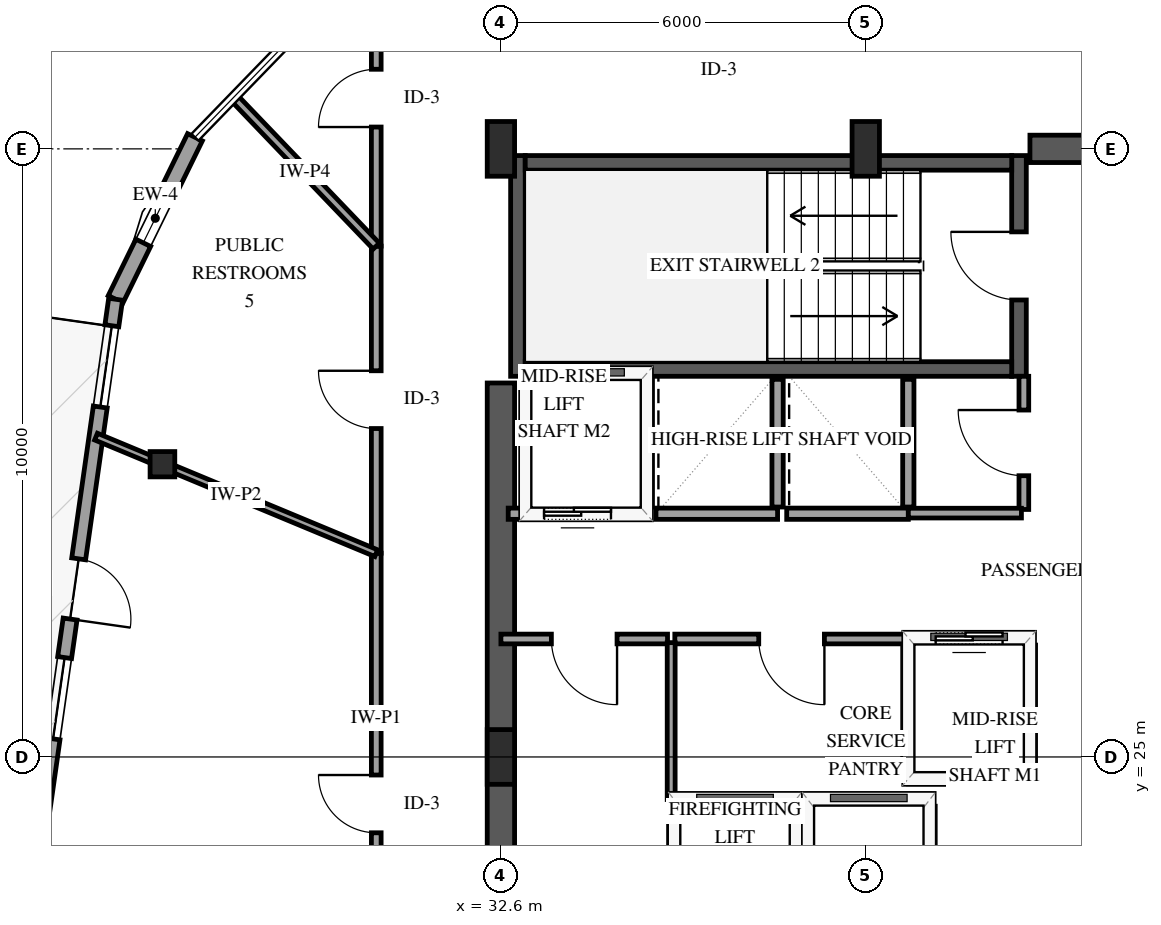
"""IFC4 building model, lengths in metres.
Left out: names, types, materials, properties, quantities, classifications, styles, units other than length and angle.
Written with IfcOpenShell. Run it as: python <this file> out.ifc"""

import sys

from ifc_helpers import new_model, si_unit, direction, frame, frame_2d, origin, origin_2d, place, context, subcontext, project, spatial, rectangle, i_section, extrude, element, fill, save


model = new_model("IFC4")
c1 = context("Model", 3, precision=1e-05, world=origin(), true_north=direction((0.0, 1.0)))
c2 = subcontext(c1, "Body", "Model", "MODEL_VIEW")
j1 = project(units=[si_unit("LENGTHUNIT", "METRE"), si_unit("PLANEANGLEUNIT", "RADIAN")], contexts=[c1])
p1 = place(None, origin())
s1 = spatial("IfcSite", under=j1, at=p1, CompositionType="ELEMENT")
p2 = place(p1, origin())
s2 = spatial("IfcBuilding", under=s1, at=p2, CompositionType="ELEMENT")
p3 = place(p2, frame((0.0, 0.0, 201.4)))
s3 = spatial("IfcBuildingStorey", under=s2, at=p3, CompositionType="ELEMENT", Elevation=201.4)
p4 = place(p3, frame((32.88, 31.26, 0.0), z_axis=(0.0, 0.0, 1.0), x_axis=(0.0, 1.0, 0.0)))
e1 = element("IfcWall", 1, at=p4, inside=s3, PredefinedType="SHEAR", context=c2, shape_type="SweptSolid", body=[
    extrude(rectangle(XDim=3.63, YDim=0.24, at=frame_2d((1.815, 0.0))), origin(), (0.0, 0.0, 1.0), 3.6),
])
p5 = place(p3, frame((41.12, 31.26, 0.0), z_axis=(0.0, 0.0, 1.0), x_axis=(0.0, 1.0, 0.0)))
e2 = element("IfcWall", 2, at=p5, inside=s3, PredefinedType="SHEAR", context=c2, shape_type="SweptSolid", body=[
    extrude(rectangle(XDim=3.63, YDim=0.24, at=frame_2d((1.815, 0.0))), origin(), (0.0, 0.0, 1.0), 3.6),
])
p6 = place(p5, frame((1.255, 0.0, 0.0)))
e3 = element("IfcOpeningElement", 3, at=p6, cuts=e2, PredefinedType="OPENING", context=c2, shape_type="SweptSolid", body=[
    extrude(rectangle(XDim=1.12, YDim=2.15, at=frame_2d((0.56, 1.075))), frame((0.0, 0.13, 0.0), z_axis=(0.0, -1.0, 0.0), x_axis=(1.0, 0.0, 0.0)), (0.0, 0.0, 1.0), 0.26),
])
for number, where, z_axis, x_axis in (
    (4, (33.0, 31.38, 0.0), (0.0, 0.0, 1.0), (1.0, 0.0, 0.0)),
    (5, (33.0, 34.77, 0.0), (0.0, 0.0, 1.0), (1.0, 0.0, 0.0)),
):
    element("IfcWall", number, at=place(p3, frame(where, z_axis=z_axis, x_axis=x_axis)), inside=s3, PredefinedType="SHEAR", context=c2, shape_type="SweptSolid", body=[
        extrude(rectangle(XDim=8.0, YDim=0.24, at=frame_2d((4.0, 0.0))), origin(), (0.0, 0.0, 1.0), 3.6),
    ])
p7 = place(p3, frame((32.6, 18.85, 0.0), z_axis=(0.0, 0.0, 1.0), x_axis=(0.0, 1.0, 0.0)))
e6 = element("IfcWall", 6, at=p7, inside=s3, PredefinedType="SHEAR", context=c2, shape_type="SweptSolid", body=[
    extrude(rectangle(XDim=12.3, YDim=0.45, at=frame_2d((6.15, 0.0))), origin(), (0.0, 0.0, 1.0), 3.6),
])
p8 = place(p3, frame((41.3, 35.0, 0.0), z_axis=(0.0, 0.0, 1.0), x_axis=(1.0, 0.0, 0.0)))
e7 = element("IfcWall", 7, at=p8, inside=s3, PredefinedType="SHEAR", context=c2, shape_type="SweptSolid", body=[
    extrude(rectangle(XDim=2.85, YDim=0.45, at=frame_2d((1.425, 0.0))), origin(), (0.0, 0.0, 1.0), 3.6),
])
for number, where, z_axis, x_axis in (
    (8, (32.6, 25.0, 0.0), (0.0, 0.0, 1.0), (1.0, 0.0, 0.0)),
    (9, (32.6, 35.0, 0.0), (0.0, 0.0, 1.0), (1.0, 0.0, 0.0)),
    (10, (38.6, 35.0, 0.0), (0.0, 0.0, 1.0), (1.0, 0.0, 0.0)),
):
    element("IfcColumn", number, at=place(p3, frame(where, z_axis=z_axis, x_axis=x_axis)), inside=s3, PredefinedType="PILASTER", context=c2, shape_type="SweptSolid", body=[
        extrude(rectangle(XDim=0.45, YDim=0.9, at=origin_2d()), origin(), (0.0, 0.0, 1.0), 3.6),
    ])
p9 = place(p3, frame((27.034, 29.814, 0.0), z_axis=(0.0, 0.0, 1.0), x_axis=(1.0, 0.0, 0.0)))
e11 = element("IfcColumn", 11, at=p9, inside=s3, PredefinedType="COLUMN", context=c2, shape_type="SweptSolid", body=[
    extrude(i_section(OverallWidth=0.406, OverallDepth=0.416, WebThickness=0.03, FlangeThickness=0.048, FilletRadius=0.038, at=origin_2d()), origin(), (0.0, 0.0, 1.0), 3.6),
])
p10 = place(p3, frame((27.569, 35.191, 0.0), z_axis=(0.0, 0.0, 1.0), x_axis=(-0.439956847616, -0.898018915299, 0.0)))
e12 = element("IfcWall", 12, at=p10, inside=s3, PredefinedType="SOLIDWALL", context=c2, shape_type="SweptSolid", body=[
    extrude(rectangle(XDim=2.967, YDim=0.27, at=frame_2d((1.483, 0.0))), origin(), (0.0, 0.0, 1.0), 2.679),
])
p11 = place(p10, frame((1.033, 0.0, 0.75)))
e13 = element("IfcOpeningElement", 13, at=p11, cuts=e12, PredefinedType="OPENING", context=c2, shape_type="SweptSolid", body=[
    extrude(rectangle(XDim=0.9, YDim=1.5, at=frame_2d((0.45, 0.75))), frame((0.0, 0.145, 0.0), z_axis=(0.0, -1.0, 0.0), x_axis=(1.0, 0.0, 0.0)), (0.0, 0.0, 1.0), 0.29),
])
p12 = place(p3, frame((26.264, 32.527, 0.0), z_axis=(0.0, 0.0, 1.0), x_axis=(-0.14089216596, -0.990024947954, 0.0)))
e14 = element("IfcWall", 14, at=p12, inside=s3, PredefinedType="SOLIDWALL", context=c2, shape_type="SweptSolid", body=[
    extrude(rectangle(XDim=9.624, YDim=0.23, at=frame_2d((4.812, 0.0))), origin(), (0.0, 0.0, 1.0), 2.679),
])
p13 = place(p12, frame((4.312, 0.0, 0.0)))
e15 = element("IfcOpeningElement", 15, at=p13, cuts=e14, PredefinedType="OPENING", context=c2, shape_type="SweptSolid", body=[
    extrude(rectangle(XDim=1.0, YDim=2.15, at=frame_2d((0.5, 1.075))), frame((0.0, 0.125, 0.0), z_axis=(0.0, -1.0, 0.0), x_axis=(1.0, 0.0, 0.0)), (0.0, 0.0, 1.0), 0.25),
])
p14 = place(p12, frame((0.44, 0.0, 0.72)))
e16 = element("IfcOpeningElement", 16, at=p14, cuts=e14, PredefinedType="OPENING", context=c2, shape_type="SweptSolid", body=[
    extrude(rectangle(XDim=1.35, YDim=1.65, at=frame_2d((0.675, 0.825))), frame((0.0, 0.125, 0.0), z_axis=(0.0, -1.0, 0.0), x_axis=(1.0, 0.0, 0.0)), (0.0, 0.0, 1.0), 0.25),
])
p15 = place(p12, frame((5.952, 0.0, 0.72)))
e17 = element("IfcOpeningElement", 17, at=p15, cuts=e14, PredefinedType="OPENING", context=c2, shape_type="SweptSolid", body=[
    extrude(rectangle(XDim=1.35, YDim=1.65, at=frame_2d((0.675, 0.825))), frame((0.0, 0.125, 0.0), z_axis=(0.0, -1.0, 0.0), x_axis=(1.0, 0.0, 0.0)), (0.0, 0.0, 1.0), 0.25),
])
p16 = place(p3, frame((35.45, 24.3, 0.0), z_axis=(0.0, 0.0, 1.0), x_axis=(1.0, 0.0, 0.0)))
e18 = element("IfcWall", 18, at=p16, inside=s3, PredefinedType="SOLIDWALL", context=c2, shape_type="SweptSolid", body=[
    extrude(rectangle(XDim=2.0, YDim=0.185, at=frame_2d((1.0, 0.0))), origin(), (0.0, 0.0, 1.0), 3.3),
])
for number, where, z_axis, x_axis in (
    (19, (35.45, 21.81, 0.0), (0.0, 0.0, 1.0), (0.0, 1.0, 0.0)),
    (20, (37.45, 21.81, 0.0), (0.0, 0.0, 1.0), (0.0, 1.0, 0.0)),
):
    element("IfcWall", number, at=place(p3, frame(where, z_axis=z_axis, x_axis=x_axis)), inside=s3, PredefinedType="SOLIDWALL", context=c2, shape_type="SweptSolid", body=[
        extrude(rectangle(XDim=2.38, YDim=0.185, at=frame_2d((1.19, 0.0))), origin(), (0.0, 0.0, 1.0), 3.3),
    ])
p17 = place(p3, frame((37.65, 24.3, 0.0), z_axis=(0.0, 0.0, 1.0), x_axis=(1.0, 0.0, 0.0)))
e21 = element("IfcWall", 21, at=p17, inside=s3, PredefinedType="SOLIDWALL", context=c2, shape_type="SweptSolid", body=[
    extrude(rectangle(XDim=2.0, YDim=0.185, at=frame_2d((1.0, 0.0))), origin(), (0.0, 0.0, 1.0), 3.3),
])
p18 = place(p3, frame((39.65, 21.81, 0.0), z_axis=(0.0, 0.0, 1.0), x_axis=(0.0, 1.0, 0.0)))
e22 = element("IfcWall", 22, at=p18, inside=s3, PredefinedType="SOLIDWALL", context=c2, shape_type="SweptSolid", body=[
    extrude(rectangle(XDim=2.38, YDim=0.185, at=frame_2d((1.19, 0.0))), origin(), (0.0, 0.0, 1.0), 3.3),
])
p19 = place(p3, frame((39.3, 24.65, 0.0), z_axis=(0.0, 0.0, 1.0), x_axis=(1.0, 0.0, 0.0)))
e23 = element("IfcWall", 23, at=p19, inside=s3, PredefinedType="SOLIDWALL", context=c2, shape_type="SweptSolid", body=[
    extrude(rectangle(XDim=2.0, YDim=0.185, at=frame_2d((1.0, 0.0))), origin(), (0.0, 0.0, 1.0), 3.3),
])
p20 = place(p3, frame((39.3, 26.95, 0.0), z_axis=(0.0, 0.0, 1.0), x_axis=(1.0, 0.0, 0.0)))
e24 = element("IfcWall", 24, at=p20, inside=s3, PredefinedType="SOLIDWALL", context=c2, shape_type="SweptSolid", body=[
    extrude(rectangle(XDim=2.0, YDim=0.185, at=frame_2d((1.0, 0.0))), origin(), (0.0, 0.0, 1.0), 3.3),
])
p21 = place(p20, frame((0.45, 0.0, 0.0)))
e25 = element("IfcOpeningElement", 25, at=p21, cuts=e24, PredefinedType="OPENING", context=c2, shape_type="SweptSolid", body=[
    extrude(rectangle(XDim=1.1, YDim=2.15, at=frame_2d((0.55, 1.075))), frame((0.0, 0.103, 0.0), z_axis=(0.0, -1.0, 0.0), x_axis=(1.0, 0.0, 0.0)), (0.0, 0.0, 1.0), 0.205),
])
for number, where, z_axis, x_axis in (
    (26, (39.3, 24.76, 0.0), (0.0, 0.0, 1.0), (0.0, 1.0, 0.0)),
    (27, (41.3, 24.76, 0.0), (0.0, 0.0, 1.0), (0.0, 1.0, 0.0)),
):
    element("IfcWall", number, at=place(p3, frame(where, z_axis=z_axis, x_axis=x_axis)), inside=s3, PredefinedType="SOLIDWALL", context=c2, shape_type="SweptSolid", body=[
        extrude(rectangle(XDim=2.08, YDim=0.185, at=frame_2d((1.04, 0.0))), origin(), (0.0, 0.0, 1.0), 3.3),
    ])
p22 = place(p3, frame((32.72, 29.0, 0.0), z_axis=(0.0, 0.0, 1.0), x_axis=(1.0, 0.0, 0.0)))
e28 = element("IfcWall", 28, at=p22, inside=s3, PredefinedType="SOLIDWALL", context=c2, shape_type="SweptSolid", body=[
    extrude(rectangle(XDim=2.28, YDim=0.185, at=frame_2d((1.14, 0.0))), origin(), (0.0, 0.0, 1.0), 3.3),
])
p23 = place(p22, frame((0.59, 0.0, 0.0)))
e29 = element("IfcOpeningElement", 29, at=p23, cuts=e28, PredefinedType="OPENING", context=c2, shape_type="SweptSolid", body=[
    extrude(rectangle(XDim=1.1, YDim=2.15, at=frame_2d((0.55, 1.075))), frame((0.0, 0.103, 0.0), z_axis=(0.0, -1.0, 0.0), x_axis=(1.0, 0.0, 0.0)), (0.0, 0.0, 1.0), 0.205),
])
p24 = place(p3, frame((35.0, 29.11, 0.0), z_axis=(0.0, 0.0, 1.0), x_axis=(0.0, 1.0, 0.0)))
e30 = element("IfcWall", 30, at=p24, inside=s3, PredefinedType="SOLIDWALL", context=c2, shape_type="SweptSolid", body=[
    extrude(rectangle(XDim=2.1, YDim=0.185, at=frame_2d((1.05, 0.0))), origin(), (0.0, 0.0, 1.0), 3.3),
])
p25 = place(p3, frame((35.15, 29.0, 0.0), z_axis=(0.0, 0.0, 1.0), x_axis=(1.0, 0.0, 0.0)))
e31 = element("IfcWall", 31, at=p25, inside=s3, PredefinedType="SOLIDWALL", context=c2, shape_type="SweptSolid", body=[
    extrude(rectangle(XDim=2.0, YDim=0.185, at=frame_2d((1.0, 0.0))), origin(), (0.0, 0.0, 1.0), 3.3),
])
p26 = place(p3, frame((37.15, 29.11, 0.0), z_axis=(0.0, 0.0, 1.0), x_axis=(0.0, 1.0, 0.0)))
e32 = element("IfcWall", 32, at=p26, inside=s3, PredefinedType="SOLIDWALL", context=c2, shape_type="SweptSolid", body=[
    extrude(rectangle(XDim=2.1, YDim=0.185, at=frame_2d((1.05, 0.0))), origin(), (0.0, 0.0, 1.0), 3.3),
])
p27 = place(p3, frame((37.3, 29.0, 0.0), z_axis=(0.0, 0.0, 1.0), x_axis=(1.0, 0.0, 0.0)))
e33 = element("IfcWall", 33, at=p27, inside=s3, PredefinedType="SOLIDWALL", context=c2, shape_type="SweptSolid", body=[
    extrude(rectangle(XDim=2.0, YDim=0.185, at=frame_2d((1.0, 0.0))), origin(), (0.0, 0.0, 1.0), 3.3),
])
p28 = place(p3, frame((39.3, 29.11, 0.0), z_axis=(0.0, 0.0, 1.0), x_axis=(0.0, 1.0, 0.0)))
e34 = element("IfcWall", 34, at=p28, inside=s3, PredefinedType="SOLIDWALL", context=c2, shape_type="SweptSolid", body=[
    extrude(rectangle(XDim=2.1, YDim=0.185, at=frame_2d((1.05, 0.0))), origin(), (0.0, 0.0, 1.0), 3.3),
])
p29 = place(p3, frame((30.55, 20.106, 0.0), z_axis=(0.0, 0.0, 1.0), x_axis=(0.0, 1.0, 0.0)))
e35 = element("IfcWall", 35, at=p29, inside=s3, PredefinedType="PARTITIONING", context=c2, shape_type="SweptSolid", body=[
    extrude(rectangle(XDim=8.245, YDim=0.16, at=frame_2d((4.123, 0.0))), origin(), (0.0, 0.0, 1.0), 3.3),
])
p30 = place(p29, frame((3.647, 0.0, 0.0)))
e36 = element("IfcOpeningElement", 36, at=p30, cuts=e35, PredefinedType="OPENING", context=c2, shape_type="SweptSolid", body=[
    extrude(rectangle(XDim=0.95, YDim=2.15, at=frame_2d((0.475, 1.075))), frame((0.0, 0.09, 0.0), z_axis=(0.0, -1.0, 0.0), x_axis=(1.0, 0.0, 0.0)), (0.0, 0.0, 1.0), 0.18),
])
p31 = place(p3, frame((30.55, 28.351, 0.0), z_axis=(0.0, 0.0, 1.0), x_axis=(0.0, 1.0, 0.0)))
e37 = element("IfcWall", 37, at=p31, inside=s3, PredefinedType="PARTITIONING", context=c2, shape_type="SweptSolid", body=[
    extrude(rectangle(XDim=5.05, YDim=0.16, at=frame_2d((2.525, 0.0))), origin(), (0.0, 0.0, 1.0), 3.3),
])
p32 = place(p31, frame((2.05, 0.0, 0.0)))
e38 = element("IfcOpeningElement", 38, at=p32, cuts=e37, PredefinedType="OPENING", context=c2, shape_type="SweptSolid", body=[
    extrude(rectangle(XDim=0.95, YDim=2.15, at=frame_2d((0.475, 1.075))), frame((0.0, 0.09, 0.0), z_axis=(0.0, -1.0, 0.0), x_axis=(1.0, 0.0, 0.0)), (0.0, 0.0, 1.0), 0.18),
])
p33 = place(p3, frame((30.55, 28.351, 0.0), z_axis=(0.0, 0.0, 1.0), x_axis=(-0.923295305511, 0.384090847093, 0.0)))
e39 = element("IfcWall", 39, at=p33, inside=s3, PredefinedType="PARTITIONING", context=c2, shape_type="SweptSolid", body=[
    extrude(rectangle(XDim=4.991, YDim=0.12, at=frame_2d((2.496, 0.0))), origin(), (0.0, 0.0, 1.0), 3.3),
])
p34 = place(p3, frame((30.55, 33.401, 0.0), z_axis=(0.0, 0.0, 1.0), x_axis=(0.0, 1.0, 0.0)))
e40 = element("IfcWall", 40, at=p34, inside=s3, PredefinedType="PARTITIONING", context=c2, shape_type="SweptSolid", body=[
    extrude(rectangle(XDim=4.866, YDim=0.16, at=frame_2d((2.433, 0.0))), origin(), (0.0, 0.0, 1.0), 3.3),
])
p35 = place(p34, frame((1.958, 0.0, 0.0)))
e41 = element("IfcOpeningElement", 41, at=p35, cuts=e40, PredefinedType="OPENING", context=c2, shape_type="SweptSolid", body=[
    extrude(rectangle(XDim=0.95, YDim=2.15, at=frame_2d((0.475, 1.075))), frame((0.0, 0.09, 0.0), z_axis=(0.0, -1.0, 0.0), x_axis=(1.0, 0.0, 0.0)), (0.0, 0.0, 1.0), 0.18),
])
p36 = place(p3, frame((39.3, 26.94, 0.0), z_axis=(0.0, 0.0, 1.0), x_axis=(-1.0, 0.0, 0.0)))
e42 = element("IfcWall", 42, at=p36, inside=s3, PredefinedType="PARTITIONING", context=c2, shape_type="SweptSolid", body=[
    extrude(rectangle(XDim=3.84, YDim=0.16, at=frame_2d((1.92, 0.0))), origin(), (0.0, 0.0, 1.0), 3.3),
])
p37 = place(p36, frame((1.38, 0.0, 0.0)))
e43 = element("IfcOpeningElement", 43, at=p37, cuts=e42, PredefinedType="OPENING", context=c2, shape_type="SweptSolid", body=[
    extrude(rectangle(XDim=1.08, YDim=2.15, at=frame_2d((0.54, 1.075))), frame((0.0, 0.09, 0.0), z_axis=(0.0, -1.0, 0.0), x_axis=(1.0, 0.0, 0.0)), (0.0, 0.0, 1.0), 0.18),
])
p38 = place(p3, frame((30.55, 33.401, 0.0), z_axis=(0.0, 0.0, 1.0), x_axis=(-0.691891282154, 0.722001699222, 0.0)))
e44 = element("IfcWall", 44, at=p38, inside=s3, PredefinedType="PARTITIONING", context=c2, shape_type="SweptSolid", body=[
    extrude(rectangle(XDim=3.389, YDim=0.14, at=frame_2d((1.695, 0.0))), origin(), (0.0, 0.0, 1.0), 3.3),
])
p39 = place(p3, frame((35.34, 26.94, 0.0), z_axis=(0.0, 0.0, 1.0), x_axis=(-1.0, 0.0, 0.0)))
e45 = element("IfcWall", 45, at=p39, inside=s3, PredefinedType="PARTITIONING", context=c2, shape_type="SweptSolid", body=[
    extrude(rectangle(XDim=2.74, YDim=0.16, at=frame_2d((1.37, 0.0))), origin(), (0.0, 0.0, 1.0), 3.3),
])
p40 = place(p39, frame((0.83, 0.0, 0.0)))
e46 = element("IfcOpeningElement", 46, at=p40, cuts=e45, PredefinedType="OPENING", context=c2, shape_type="SweptSolid", body=[
    extrude(rectangle(XDim=1.08, YDim=2.15, at=frame_2d((0.54, 1.075))), frame((0.0, 0.09, 0.0), z_axis=(0.0, -1.0, 0.0), x_axis=(1.0, 0.0, 0.0)), (0.0, 0.0, 1.0), 0.18),
])
p41 = place(p3, frame((35.4, 26.88, 0.0), z_axis=(0.0, 0.0, 1.0), x_axis=(0.0, -1.0, 0.0)))
e47 = element("IfcWall", 47, at=p41, inside=s3, PredefinedType="PARTITIONING", context=c2, shape_type="SweptSolid", body=[
    extrude(rectangle(XDim=2.58, YDim=0.13, at=frame_2d((1.29, 0.0))), origin(), (0.0, 0.0, 1.0), 3.3),
])
p42 = place(p3, frame((41.2, 29.07, 0.0), z_axis=(0.0, 0.0, 1.0), x_axis=(0.0, 1.0, 0.0)))
e48 = element("IfcWall", 48, at=p42, inside=s3, PredefinedType="PARTITIONING", context=c2, shape_type="SweptSolid", body=[
    extrude(rectangle(XDim=2.19, YDim=0.16, at=frame_2d((1.095, 0.0))), origin(), (0.0, 0.0, 1.0), 3.3),
])
p43 = place(p42, frame((0.555, 0.0, 0.0)))
e49 = element("IfcOpeningElement", 49, at=p43, cuts=e48, PredefinedType="OPENING", context=c2, shape_type="SweptSolid", body=[
    extrude(rectangle(XDim=1.08, YDim=2.15, at=frame_2d((0.54, 1.075))), frame((0.0, 0.09, 0.0), z_axis=(0.0, -1.0, 0.0), x_axis=(1.0, 0.0, 0.0)), (0.0, 0.0, 1.0), 0.18),
])
p44 = place(p3, frame((39.3, 29.01, 0.0), z_axis=(0.0, 0.0, 1.0), x_axis=(1.0, 0.0, 0.0)))
e50 = element("IfcWall", 50, at=p44, inside=s3, PredefinedType="PARTITIONING", context=c2, shape_type="SweptSolid", body=[
    extrude(rectangle(XDim=1.86, YDim=0.16, at=frame_2d((0.93, 0.0))), origin(), (0.0, 0.0, 1.0), 3.3),
])
p45 = place(p11, origin())
e51 = element("IfcWindow", 51, at=p45, inside=s3, PartitioningType="SINGLE_PANEL", PredefinedType="WINDOW", context=c2, shape_type="SweptSolid", body=[
    extrude(rectangle(XDim=0.9, YDim=1.5, at=frame_2d((0.45, 0.75))), frame((0.0, 0.03, 0.0), z_axis=(0.0, -1.0, 0.0), x_axis=(1.0, 0.0, 0.0)), (0.0, 0.0, 1.0), 0.06),
])
fill(e13, e51)
p46 = place(p13, origin())
e52 = element("IfcDoor", 52, at=p46, inside=s3, OperationType="SINGLE_SWING_RIGHT", PredefinedType="DOOR", context=c2, shape_type="SweptSolid", body=[
    extrude(rectangle(XDim=1.0, YDim=2.15, at=frame_2d((0.5, 1.075))), frame((0.0, 0.025, 0.0), z_axis=(0.0, -1.0, 0.0), x_axis=(1.0, 0.0, 0.0)), (0.0, 0.0, 1.0), 0.05),
])
fill(e15, e52)
p47 = place(p14, origin())
e53 = element("IfcWindow", 53, at=p47, inside=s3, PartitioningType="SINGLE_PANEL", PredefinedType="WINDOW", context=c2, shape_type="SweptSolid", body=[
    extrude(rectangle(XDim=1.35, YDim=1.65, at=frame_2d((0.675, 0.825))), frame((0.0, 0.03, 0.0), z_axis=(0.0, -1.0, 0.0), x_axis=(1.0, 0.0, 0.0)), (0.0, 0.0, 1.0), 0.06),
])
fill(e16, e53)
p48 = place(p15, origin())
e54 = element("IfcWindow", 54, at=p48, inside=s3, PartitioningType="SINGLE_PANEL", PredefinedType="WINDOW", context=c2, shape_type="SweptSolid", body=[
    extrude(rectangle(XDim=1.35, YDim=1.65, at=frame_2d((0.675, 0.825))), frame((0.0, 0.03, 0.0), z_axis=(0.0, -1.0, 0.0), x_axis=(1.0, 0.0, 0.0)), (0.0, 0.0, 1.0), 0.06),
])
fill(e17, e54)
p49 = place(p21, origin())
e55 = element("IfcDoor", 55, at=p49, inside=s3, OperationType="SLIDING_TO_LEFT", PredefinedType="DOOR", context=c2, shape_type="SweptSolid", body=[
    extrude(rectangle(XDim=1.1, YDim=2.15, at=frame_2d((0.55, 1.075))), frame((0.0, 0.025, 0.0), z_axis=(0.0, -1.0, 0.0), x_axis=(1.0, 0.0, 0.0)), (0.0, 0.0, 1.0), 0.05),
])
fill(e25, e55)
p50 = place(p23, origin())
e56 = element("IfcDoor", 56, at=p50, inside=s3, OperationType="SLIDING_TO_LEFT", PredefinedType="DOOR", context=c2, shape_type="SweptSolid", body=[
    extrude(rectangle(XDim=1.1, YDim=2.15, at=frame_2d((0.55, 1.075))), frame((0.0, 0.025, 0.0), z_axis=(0.0, -1.0, 0.0), x_axis=(1.0, 0.0, 0.0)), (0.0, 0.0, 1.0), 0.05),
])
fill(e29, e56)
p51 = place(p6, origin())
e57 = element("IfcDoor", 57, at=p51, inside=s3, OperationType="SINGLE_SWING_RIGHT", PredefinedType="DOOR", context=c2, shape_type="SweptSolid", body=[
    extrude(rectangle(XDim=1.12, YDim=2.15, at=frame_2d((0.56, 1.075))), frame((0.0, 0.025, 0.0), z_axis=(0.0, -1.0, 0.0), x_axis=(1.0, 0.0, 0.0)), (0.0, 0.0, 1.0), 0.05),
])
fill(e3, e57)
p52 = place(p30, origin())
e58 = element("IfcDoor", 58, at=p52, inside=s3, OperationType="SINGLE_SWING_RIGHT", PredefinedType="DOOR", context=c2, shape_type="SweptSolid", body=[
    extrude(rectangle(XDim=0.95, YDim=2.15, at=frame_2d((0.475, 1.075))), frame((0.0, 0.025, 0.0), z_axis=(0.0, -1.0, 0.0), x_axis=(1.0, 0.0, 0.0)), (0.0, 0.0, 1.0), 0.05),
])
fill(e36, e58)
p53 = place(p32, origin())
e59 = element("IfcDoor", 59, at=p53, inside=s3, OperationType="SINGLE_SWING_RIGHT", PredefinedType="DOOR", context=c2, shape_type="SweptSolid", body=[
    extrude(rectangle(XDim=0.95, YDim=2.15, at=frame_2d((0.475, 1.075))), frame((0.0, 0.025, 0.0), z_axis=(0.0, -1.0, 0.0), x_axis=(1.0, 0.0, 0.0)), (0.0, 0.0, 1.0), 0.05),
])
fill(e38, e59)
p54 = place(p35, origin())
e60 = element("IfcDoor", 60, at=p54, inside=s3, OperationType="SINGLE_SWING_LEFT", PredefinedType="DOOR", context=c2, shape_type="SweptSolid", body=[
    extrude(rectangle(XDim=0.95, YDim=2.15, at=frame_2d((0.475, 1.075))), frame((0.0, 0.025, 0.0), z_axis=(0.0, -1.0, 0.0), x_axis=(1.0, 0.0, 0.0)), (0.0, 0.0, 1.0), 0.05),
])
fill(e41, e60)
p55 = place(p37, origin())
e61 = element("IfcDoor", 61, at=p55, inside=s3, OperationType="SINGLE_SWING_LEFT", PredefinedType="DOOR", context=c2, shape_type="SweptSolid", body=[
    extrude(rectangle(XDim=1.08, YDim=2.15, at=frame_2d((0.54, 1.075))), frame((0.0, 0.025, 0.0), z_axis=(0.0, -1.0, 0.0), x_axis=(1.0, 0.0, 0.0)), (0.0, 0.0, 1.0), 0.05),
])
fill(e43, e61)
p56 = place(p40, origin())
e62 = element("IfcDoor", 62, at=p56, inside=s3, OperationType="SINGLE_SWING_LEFT", PredefinedType="DOOR", context=c2, shape_type="SweptSolid", body=[
    extrude(rectangle(XDim=1.08, YDim=2.15, at=frame_2d((0.54, 1.075))), frame((0.0, 0.025, 0.0), z_axis=(0.0, -1.0, 0.0), x_axis=(1.0, 0.0, 0.0)), (0.0, 0.0, 1.0), 0.05),
])
fill(e46, e62)
p57 = place(p43, origin())
e63 = element("IfcDoor", 63, at=p57, inside=s3, OperationType="SINGLE_SWING_RIGHT", PredefinedType="DOOR", context=c2, shape_type="SweptSolid", body=[
    extrude(rectangle(XDim=1.08, YDim=2.15, at=frame_2d((0.54, 1.075))), frame((0.0, 0.025, 0.0), z_axis=(0.0, -1.0, 0.0), x_axis=(1.0, 0.0, 0.0)), (0.0, 0.0, 1.0), 0.05),
])
fill(e49, e63)
save(model, sys.argv[1])
